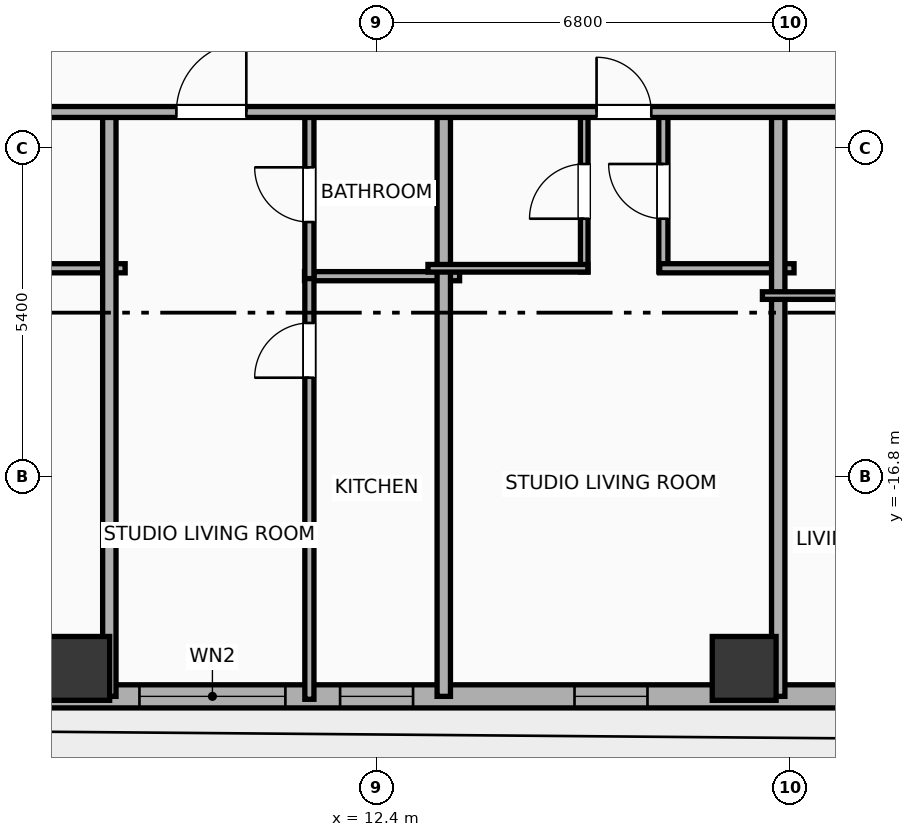
"""IFC4 building model, lengths in metres.
Left out: names, types, materials, properties, quantities, classifications, styles, units other than length and angle.
Written with IfcOpenShell. Run it as: python <this file> out.ifc"""

import sys

from ifc_helpers import new_model, si_unit, direction, frame, frame_2d, origin, origin_2d, place, context, subcontext, project, spatial, rectangle, hollow_rectangle, extrude, element, fill, save


model = new_model("IFC4")
c1 = context("Model", 3, precision=1e-05, world=origin(), true_north=direction((0.0, 1.0)))
c2 = subcontext(c1, "Body", "Model", "MODEL_VIEW")
j1 = project(units=[si_unit("LENGTHUNIT", "METRE"), si_unit("PLANEANGLEUNIT", "RADIAN")], contexts=[c1])
p1 = place(None, origin())
s1 = spatial("IfcSite", under=j1, at=p1, CompositionType="ELEMENT")
p2 = place(p1, origin())
s2 = spatial("IfcBuilding", under=s1, at=p2, CompositionType="ELEMENT")
p3 = place(p2, frame((0.0, 0.0, 85.8)))
s3 = spatial("IfcBuildingStorey", under=s2, at=p3, CompositionType="ELEMENT", Elevation=85.8)
for number, where, z_axis, x_axis in (
    (1, (7.48, -19.95, -0.4), (0.0, 0.0, 1.0), (1.0, 0.0, 0.0)),
    (2, (18.44, -19.95, -0.4), (0.0, 0.0, 1.0), (1.0, 0.0, 0.0)),
):
    element("IfcColumn", number, at=place(p3, frame(where, z_axis=z_axis, x_axis=x_axis)), inside=s3, PredefinedType="COLUMN", context=c2, shape_type="SweptSolid", body=[
        extrude(hollow_rectangle(XDim=1.05, YDim=1.05, WallThickness=0.036, at=origin_2d()), origin(), (0.0, 0.0, 1.0), 4.3),
    ])
p4 = place(p3, frame((29.381, -20.41, 0.0), z_axis=(0.0, 0.0, 1.0), x_axis=(-1.0, 0.0, 0.0)))
e3 = element("IfcWall", 3, at=p4, inside=s3, PredefinedType="ELEMENTEDWALL", context=c2, shape_type="SweptSolid", body=[
    extrude(rectangle(XDim=54.763, YDim=0.38, at=frame_2d((27.381, 0.0))), origin(), (0.0, 0.0, 1.0), 2.54),
])
p5 = place(p4, frame((18.486, 0.0, 0.75)))
e4 = element("IfcOpeningElement", 4, at=p5, cuts=e3, PredefinedType="OPENING", context=c2, shape_type="SweptSolid", body=[
    extrude(rectangle(XDim=2.4, YDim=1.45, at=frame_2d((1.2, 0.725))), frame((0.0, 0.2, 0.0), z_axis=(0.0, -1.0, 0.0), x_axis=(1.0, 0.0, 0.0)), (0.0, 0.0, 1.0), 0.4),
])
p6 = place(p4, frame((47.567, 0.0, 0.75)))
e5 = element("IfcOpeningElement", 5, at=p6, cuts=e3, PredefinedType="OPENING", context=c2, shape_type="SweptSolid", body=[
    extrude(rectangle(XDim=2.4, YDim=1.45, at=frame_2d((1.2, 0.725))), frame((0.0, 0.2, 0.0), z_axis=(0.0, -1.0, 0.0), x_axis=(1.0, 0.0, 0.0)), (0.0, 0.0, 1.0), 0.4),
])
p7 = place(p4, frame((7.464, 0.0, 0.0)))
e6 = element("IfcOpeningElement", 6, at=p7, cuts=e3, PredefinedType="OPENING", context=c2, shape_type="SweptSolid", body=[
    extrude(rectangle(XDim=1.5, YDim=2.05, at=frame_2d((0.75, 1.025))), frame((0.0, 0.2, 0.0), z_axis=(0.0, -1.0, 0.0), x_axis=(1.0, 0.0, 0.0)), (0.0, 0.0, 1.0), 0.4),
])
p8 = place(p4, frame((51.831, 0.0, 0.55)))
e7 = element("IfcOpeningElement", 7, at=p8, cuts=e3, PredefinedType="OPENING", context=c2, shape_type="SweptSolid", body=[
    extrude(rectangle(XDim=1.2, YDim=1.15, at=frame_2d((0.6, 0.575))), frame((0.0, 0.2, 0.0), z_axis=(0.0, -1.0, 0.0), x_axis=(1.0, 0.0, 0.0)), (0.0, 0.0, 1.0), 0.4),
])
p9 = place(p4, frame((44.606, 0.0, 0.55)))
e8 = element("IfcOpeningElement", 8, at=p9, cuts=e3, PredefinedType="OPENING", context=c2, shape_type="SweptSolid", body=[
    extrude(rectangle(XDim=1.2, YDim=1.15, at=frame_2d((0.6, 0.575))), frame((0.0, 0.2, 0.0), z_axis=(0.0, -1.0, 0.0), x_axis=(1.0, 0.0, 0.0)), (0.0, 0.0, 1.0), 0.4),
])
p10 = place(p4, frame((38.906, 0.0, 0.55)))
e9 = element("IfcOpeningElement", 9, at=p10, cuts=e3, PredefinedType="OPENING", context=c2, shape_type="SweptSolid", body=[
    extrude(rectangle(XDim=1.2, YDim=1.15, at=frame_2d((0.6, 0.575))), frame((0.0, 0.2, 0.0), z_axis=(0.0, -1.0, 0.0), x_axis=(1.0, 0.0, 0.0)), (0.0, 0.0, 1.0), 0.4),
])
p11 = place(p4, frame((41.656, 0.0, 0.55)))
e10 = element("IfcOpeningElement", 10, at=p11, cuts=e3, PredefinedType="OPENING", context=c2, shape_type="SweptSolid", body=[
    extrude(rectangle(XDim=1.2, YDim=1.15, at=frame_2d((0.6, 0.575))), frame((0.0, 0.2, 0.0), z_axis=(0.0, -1.0, 0.0), x_axis=(1.0, 0.0, 0.0)), (0.0, 0.0, 1.0), 0.4),
])
p12 = place(p4, frame((33.666, 0.0, 0.55)))
e11 = element("IfcOpeningElement", 11, at=p12, cuts=e3, PredefinedType="OPENING", context=c2, shape_type="SweptSolid", body=[
    extrude(rectangle(XDim=1.2, YDim=1.15, at=frame_2d((0.6, 0.575))), frame((0.0, 0.2, 0.0), z_axis=(0.0, -1.0, 0.0), x_axis=(1.0, 0.0, 0.0)), (0.0, 0.0, 1.0), 0.4),
])
p13 = place(p4, frame((36.176, 0.0, 0.55)))
e12 = element("IfcOpeningElement", 12, at=p13, cuts=e3, PredefinedType="OPENING", context=c2, shape_type="SweptSolid", body=[
    extrude(rectangle(XDim=1.2, YDim=1.15, at=frame_2d((0.6, 0.575))), frame((0.0, 0.2, 0.0), z_axis=(0.0, -1.0, 0.0), x_axis=(1.0, 0.0, 0.0)), (0.0, 0.0, 1.0), 0.4),
])
p14 = place(p4, frame((27.861, 0.0, 0.55)))
e13 = element("IfcOpeningElement", 13, at=p14, cuts=e3, PredefinedType="OPENING", context=c2, shape_type="SweptSolid", body=[
    extrude(rectangle(XDim=1.2, YDim=1.15, at=frame_2d((0.6, 0.575))), frame((0.0, 0.2, 0.0), z_axis=(0.0, -1.0, 0.0), x_axis=(1.0, 0.0, 0.0)), (0.0, 0.0, 1.0), 0.4),
])
p15 = place(p4, frame((30.611, 0.0, 0.55)))
e14 = element("IfcOpeningElement", 14, at=p15, cuts=e3, PredefinedType="OPENING", context=c2, shape_type="SweptSolid", body=[
    extrude(rectangle(XDim=1.2, YDim=1.15, at=frame_2d((0.6, 0.575))), frame((0.0, 0.2, 0.0), z_axis=(0.0, -1.0, 0.0), x_axis=(1.0, 0.0, 0.0)), (0.0, 0.0, 1.0), 0.4),
])
p16 = place(p4, frame((23.531, 0.0, 0.55)))
e15 = element("IfcOpeningElement", 15, at=p16, cuts=e3, PredefinedType="OPENING", context=c2, shape_type="SweptSolid", body=[
    extrude(rectangle(XDim=1.2, YDim=1.15, at=frame_2d((0.6, 0.575))), frame((0.0, 0.2, 0.0), z_axis=(0.0, -1.0, 0.0), x_axis=(1.0, 0.0, 0.0)), (0.0, 0.0, 1.0), 0.4),
])
p17 = place(p4, frame((16.386, 0.0, 0.55)))
e16 = element("IfcOpeningElement", 16, at=p17, cuts=e3, PredefinedType="OPENING", context=c2, shape_type="SweptSolid", body=[
    extrude(rectangle(XDim=1.2, YDim=1.15, at=frame_2d((0.6, 0.575))), frame((0.0, 0.2, 0.0), z_axis=(0.0, -1.0, 0.0), x_axis=(1.0, 0.0, 0.0)), (0.0, 0.0, 1.0), 0.4),
])
p18 = place(p4, frame((12.531, 0.0, 0.55)))
e17 = element("IfcOpeningElement", 17, at=p18, cuts=e3, PredefinedType="OPENING", context=c2, shape_type="SweptSolid", body=[
    extrude(rectangle(XDim=1.2, YDim=1.15, at=frame_2d((0.6, 0.575))), frame((0.0, 0.2, 0.0), z_axis=(0.0, -1.0, 0.0), x_axis=(1.0, 0.0, 0.0)), (0.0, 0.0, 1.0), 0.4),
])
p19 = place(p4, frame((4.377, 0.0, 0.55)))
e18 = element("IfcOpeningElement", 18, at=p19, cuts=e3, PredefinedType="OPENING", context=c2, shape_type="SweptSolid", body=[
    extrude(rectangle(XDim=1.2, YDim=1.15, at=frame_2d((0.6, 0.575))), frame((0.0, 0.2, 0.0), z_axis=(0.0, -1.0, 0.0), x_axis=(1.0, 0.0, 0.0)), (0.0, 0.0, 1.0), 0.4),
])
p20 = place(p4, frame((1.481, 0.0, 0.55)))
e19 = element("IfcOpeningElement", 19, at=p20, cuts=e3, PredefinedType="OPENING", context=c2, shape_type="SweptSolid", body=[
    extrude(rectangle(XDim=1.2, YDim=1.15, at=frame_2d((0.6, 0.575))), frame((0.0, 0.2, 0.0), z_axis=(0.0, -1.0, 0.0), x_axis=(1.0, 0.0, 0.0)), (0.0, 0.0, 1.0), 0.4),
])
p21 = place(p3, frame((6.051, -13.37, 0.0), z_axis=(0.0, 0.0, 1.0), x_axis=(1.0, 0.0, 0.0)))
e20 = element("IfcWall", 20, at=p21, inside=s3, PredefinedType="PLUMBINGWALL", context=c2, shape_type="SweptSolid", body=[
    extrude(rectangle(XDim=2.209, YDim=0.15, at=frame_2d((1.104, 0.0))), origin(), (0.0, 0.0, 1.0), 3.65),
])
p22 = place(p3, frame((8.0, -20.41, 0.0), z_axis=(0.0, 0.0, 1.0), x_axis=(0.0, 1.0, 0.0)))
e21 = element("IfcWall", 21, at=p22, inside=s3, PredefinedType="PARTITIONING", context=c2, shape_type="SweptSolid", body=[
    extrude(rectangle(XDim=9.69, YDim=0.22, at=frame_2d((4.845, 0.0))), origin(), (0.0, 0.0, 1.0), 2.54),
])
p23 = place(p3, frame((11.21, -13.5, 0.0), z_axis=(0.0, 0.0, 1.0), x_axis=(1.0, 0.0, 0.0)))
e22 = element("IfcWall", 22, at=p23, inside=s3, PredefinedType="PLUMBINGWALL", context=c2, shape_type="SweptSolid", body=[
    extrude(rectangle(XDim=2.55, YDim=0.15, at=frame_2d((1.275, 0.0))), origin(), (0.0, 0.0, 1.0), 3.65),
])
p24 = place(p3, frame((11.29, -20.458, 0.0), z_axis=(0.0, 0.0, 1.0), x_axis=(0.0, 1.0, 0.0)))
e23 = element("IfcWall", 23, at=p24, inside=s3, PredefinedType="PLUMBINGWALL", context=c2, shape_type="SweptSolid", body=[
    extrude(rectangle(XDim=6.998, YDim=0.15, at=frame_2d((3.499, 0.0))), origin(), (0.0, 0.0, 1.0), 3.65),
])
p25 = place(p24, frame((5.288, 0.0, 0.0)))
e24 = element("IfcOpeningElement", 24, at=p25, cuts=e23, PredefinedType="OPENING", context=c2, shape_type="SweptSolid", body=[
    extrude(rectangle(XDim=0.9, YDim=2.05, at=frame_2d((0.45, 1.025))), frame((0.0, 0.085, 0.0), z_axis=(0.0, -1.0, 0.0), x_axis=(1.0, 0.0, 0.0)), (0.0, 0.0, 1.0), 0.17),
])
p26 = place(p3, frame((11.29, -13.54, 0.0), z_axis=(0.0, 0.0, 1.0), x_axis=(0.0, 1.0, 0.0)))
e25 = element("IfcWall", 25, at=p26, inside=s3, PredefinedType="PLUMBINGWALL", context=c2, shape_type="SweptSolid", body=[
    extrude(rectangle(XDim=2.76, YDim=0.15, at=frame_2d((1.38, 0.0))), origin(), (0.0, 0.0, 1.0), 3.65),
])
p27 = place(p26, frame((0.93, 0.0, 0.0)))
e26 = element("IfcOpeningElement", 26, at=p27, cuts=e25, PredefinedType="OPENING", context=c2, shape_type="SweptSolid", body=[
    extrude(rectangle(XDim=0.9, YDim=2.05, at=frame_2d((0.45, 1.025))), frame((0.0, 0.085, 0.0), z_axis=(0.0, -1.0, 0.0), x_axis=(1.0, 0.0, 0.0)), (0.0, 0.0, 1.0), 0.17),
])
p28 = place(p3, frame((13.5, -20.41, 0.0), z_axis=(0.0, 0.0, 1.0), x_axis=(0.0, 1.0, 0.0)))
e27 = element("IfcWall", 27, at=p28, inside=s3, PredefinedType="PARTITIONING", context=c2, shape_type="SweptSolid", body=[
    extrude(rectangle(XDim=9.69, YDim=0.22, at=frame_2d((4.845, 0.0))), origin(), (0.0, 0.0, 1.0), 3.65),
])
p29 = place(p3, frame((15.81, -13.43, 0.0), z_axis=(0.0, 0.0, 1.0), x_axis=(0.0, 1.0, 0.0)))
e28 = element("IfcWall", 28, at=p29, inside=s3, PredefinedType="PARTITIONING", context=c2, shape_type="SweptSolid", body=[
    extrude(rectangle(XDim=2.65, YDim=0.125, at=frame_2d((1.325, 0.0))), origin(), (0.0, 0.0, 1.0), 3.65),
])
p30 = place(p29, frame((0.875, 0.0, 0.0)))
e29 = element("IfcOpeningElement", 29, at=p30, cuts=e28, PredefinedType="OPENING", context=c2, shape_type="SweptSolid", body=[
    extrude(rectangle(XDim=0.9, YDim=2.05, at=frame_2d((0.45, 1.025))), frame((0.0, 0.073, 0.0), z_axis=(0.0, -1.0, 0.0), x_axis=(1.0, 0.0, 0.0)), (0.0, 0.0, 1.0), 0.145),
])
p31 = place(p3, frame((17.111, -13.43, 0.0), z_axis=(0.0, 0.0, 1.0), x_axis=(0.0, 1.0, 0.0)))
e30 = element("IfcWall", 30, at=p31, inside=s3, PredefinedType="PLUMBINGWALL", context=c2, shape_type="SweptSolid", body=[
    extrude(rectangle(XDim=2.65, YDim=0.15, at=frame_2d((1.325, 0.0))), origin(), (0.0, 0.0, 1.0), 3.65),
])
p32 = place(p31, frame((0.875, 0.0, 0.0)))
e31 = element("IfcOpeningElement", 31, at=p32, cuts=e30, PredefinedType="OPENING", context=c2, shape_type="SweptSolid", body=[
    extrude(rectangle(XDim=0.9, YDim=2.05, at=frame_2d((0.45, 1.025))), frame((0.0, 0.085, 0.0), z_axis=(0.0, -1.0, 0.0), x_axis=(1.0, 0.0, 0.0)), (0.0, 0.0, 1.0), 0.17),
])
p33 = place(p3, frame((13.24, -13.37, 0.0), z_axis=(0.0, 0.0, 1.0), x_axis=(1.0, 0.0, 0.0)))
e32 = element("IfcWall", 32, at=p33, inside=s3, PredefinedType="PARTITIONING", context=c2, shape_type="SweptSolid", body=[
    extrude(rectangle(XDim=2.63, YDim=0.125, at=frame_2d((1.315, 0.0))), origin(), (0.0, 0.0, 1.0), 3.65),
])
p34 = place(p3, frame((17.051, -13.37, 0.0), z_axis=(0.0, 0.0, 1.0), x_axis=(1.0, 0.0, 0.0)))
e33 = element("IfcWall", 33, at=p34, inside=s3, PredefinedType="PLUMBINGWALL", context=c2, shape_type="SweptSolid", body=[
    extrude(rectangle(XDim=2.209, YDim=0.15, at=frame_2d((1.104, 0.0))), origin(), (0.0, 0.0, 1.0), 3.65),
])
p35 = place(p3, frame((19.0, -20.41, 0.0), z_axis=(0.0, 0.0, 1.0), x_axis=(0.0, 1.0, 0.0)))
e34 = element("IfcWall", 34, at=p35, inside=s3, PredefinedType="PARTITIONING", context=c2, shape_type="SweptSolid", body=[
    extrude(rectangle(XDim=9.69, YDim=0.22, at=frame_2d((4.845, 0.0))), origin(), (0.0, 0.0, 1.0), 2.54),
])
p36 = place(p3, frame((18.74, -13.819, 0.0), z_axis=(0.0, 0.0, 1.0), x_axis=(1.0, 0.0, 0.0)))
e35 = element("IfcWall", 35, at=p36, inside=s3, PredefinedType="PARTITIONING", context=c2, shape_type="SweptSolid", body=[
    extrude(rectangle(XDim=2.69, YDim=0.125, at=frame_2d((1.345, 0.0))), origin(), (0.0, 0.0, 1.0), 3.65),
])
p37 = place(p3, frame((-29.21, -10.8, 0.0), z_axis=(0.0, 0.0, 1.0), x_axis=(1.0, 0.0, 0.0)))
e36 = element("IfcWall", 36, at=p37, inside=s3, PredefinedType="PARTITIONING", context=c2, shape_type="SweptSolid", body=[
    extrude(rectangle(XDim=62.42, YDim=0.18, at=frame_2d((31.21, 0.0))), origin(), (0.0, 0.0, 1.0), 3.65),
])
p38 = place(p37, frame((3.357, 0.0, 0.0)))
e37 = element("IfcOpeningElement", 37, at=p38, cuts=e36, PredefinedType="OPENING", context=c2, shape_type="SweptSolid", body=[
    extrude(rectangle(XDim=1.15, YDim=2.05, at=frame_2d((0.575, 1.025))), frame((0.0, 0.1, 0.0), z_axis=(0.0, -1.0, 0.0), x_axis=(1.0, 0.0, 0.0)), (0.0, 0.0, 1.0), 0.2),
])
p39 = place(p37, frame((10.998, 0.0, 0.0)))
e38 = element("IfcOpeningElement", 38, at=p39, cuts=e36, PredefinedType="OPENING", context=c2, shape_type="SweptSolid", body=[
    extrude(rectangle(XDim=1.15, YDim=2.05, at=frame_2d((0.575, 1.025))), frame((0.0, 0.1, 0.0), z_axis=(0.0, -1.0, 0.0), x_axis=(1.0, 0.0, 0.0)), (0.0, 0.0, 1.0), 0.2),
])
p40 = place(p37, frame((18.482, 0.0, 0.0)))
e39 = element("IfcOpeningElement", 39, at=p40, cuts=e36, PredefinedType="OPENING", context=c2, shape_type="SweptSolid", body=[
    extrude(rectangle(XDim=1.15, YDim=2.05, at=frame_2d((0.575, 1.025))), frame((0.0, 0.1, 0.0), z_axis=(0.0, -1.0, 0.0), x_axis=(1.0, 0.0, 0.0)), (0.0, 0.0, 1.0), 0.2),
])
p41 = place(p37, frame((23.962, 0.0, 0.0)))
e40 = element("IfcOpeningElement", 40, at=p41, cuts=e36, PredefinedType="OPENING", context=c2, shape_type="SweptSolid", body=[
    extrude(rectangle(XDim=1.15, YDim=2.05, at=frame_2d((0.575, 1.025))), frame((0.0, 0.1, 0.0), z_axis=(0.0, -1.0, 0.0), x_axis=(1.0, 0.0, 0.0)), (0.0, 0.0, 1.0), 0.2),
])
p42 = place(p37, frame((29.524, 0.0, 0.0)))
e41 = element("IfcOpeningElement", 41, at=p42, cuts=e36, PredefinedType="OPENING", context=c2, shape_type="SweptSolid", body=[
    extrude(rectangle(XDim=1.15, YDim=2.05, at=frame_2d((0.575, 1.025))), frame((0.0, 0.1, 0.0), z_axis=(0.0, -1.0, 0.0), x_axis=(1.0, 0.0, 0.0)), (0.0, 0.0, 1.0), 0.2),
])
p43 = place(p37, frame((34.218, 0.0, 0.0)))
e42 = element("IfcOpeningElement", 42, at=p43, cuts=e36, PredefinedType="OPENING", context=c2, shape_type="SweptSolid", body=[
    extrude(rectangle(XDim=0.9, YDim=2.05, at=frame_2d((0.45, 1.025))), frame((0.0, 0.1, 0.0), z_axis=(0.0, -1.0, 0.0), x_axis=(1.0, 0.0, 0.0)), (0.0, 0.0, 1.0), 0.2),
])
p44 = place(p37, frame((38.313, 0.0, 0.0)))
e43 = element("IfcOpeningElement", 43, at=p44, cuts=e36, PredefinedType="OPENING", context=c2, shape_type="SweptSolid", body=[
    extrude(rectangle(XDim=1.15, YDim=2.05, at=frame_2d((0.575, 1.025))), frame((0.0, 0.1, 0.0), z_axis=(0.0, -1.0, 0.0), x_axis=(1.0, 0.0, 0.0)), (0.0, 0.0, 1.0), 0.2),
])
p45 = place(p37, frame((45.223, 0.0, 0.0)))
e44 = element("IfcOpeningElement", 44, at=p45, cuts=e36, PredefinedType="OPENING", context=c2, shape_type="SweptSolid", body=[
    extrude(rectangle(XDim=0.9, YDim=2.05, at=frame_2d((0.45, 1.025))), frame((0.0, 0.1, 0.0), z_axis=(0.0, -1.0, 0.0), x_axis=(1.0, 0.0, 0.0)), (0.0, 0.0, 1.0), 0.2),
])
p46 = place(p37, frame((51.352, 0.0, 0.0)))
e45 = element("IfcOpeningElement", 45, at=p46, cuts=e36, PredefinedType="OPENING", context=c2, shape_type="SweptSolid", body=[
    extrude(rectangle(XDim=1.15, YDim=2.05, at=frame_2d((0.575, 1.025))), frame((0.0, 0.1, 0.0), z_axis=(0.0, -1.0, 0.0), x_axis=(1.0, 0.0, 0.0)), (0.0, 0.0, 1.0), 0.2),
])
p47 = place(p37, frame((58.493, 0.0, 0.0)))
e46 = element("IfcOpeningElement", 46, at=p47, cuts=e36, PredefinedType="OPENING", context=c2, shape_type="SweptSolid", body=[
    extrude(rectangle(XDim=1.15, YDim=2.05, at=frame_2d((0.575, 1.025))), frame((0.0, 0.1, 0.0), z_axis=(0.0, -1.0, 0.0), x_axis=(1.0, 0.0, 0.0)), (0.0, 0.0, 1.0), 0.2),
])
p48 = place(p5, origin())
e47 = element("IfcWindow", 47, at=p48, inside=s3, PartitioningType="SINGLE_PANEL", PredefinedType="WINDOW", context=c2, shape_type="SweptSolid", body=[
    extrude(rectangle(XDim=2.4, YDim=1.45, at=frame_2d((1.2, 0.725))), frame((0.0, 0.03, 0.0), z_axis=(0.0, -1.0, 0.0), x_axis=(1.0, 0.0, 0.0)), (0.0, 0.0, 1.0), 0.06),
])
fill(e4, e47)
p49 = place(p17, origin())
e48 = element("IfcWindow", 48, at=p49, inside=s3, PartitioningType="SINGLE_PANEL", PredefinedType="WINDOW", context=c2, shape_type="SweptSolid", body=[
    extrude(rectangle(XDim=1.2, YDim=1.15, at=frame_2d((0.6, 0.575))), frame((0.0, 0.03, 0.0), z_axis=(0.0, -1.0, 0.0), x_axis=(1.0, 0.0, 0.0)), (0.0, 0.0, 1.0), 0.06),
])
fill(e16, e48)
p50 = place(p18, origin())
e49 = element("IfcWindow", 49, at=p50, inside=s3, PartitioningType="SINGLE_PANEL", PredefinedType="WINDOW", context=c2, shape_type="SweptSolid", body=[
    extrude(rectangle(XDim=1.2, YDim=1.15, at=frame_2d((0.6, 0.575))), frame((0.0, 0.03, 0.0), z_axis=(0.0, -1.0, 0.0), x_axis=(1.0, 0.0, 0.0)), (0.0, 0.0, 1.0), 0.06),
])
fill(e17, e49)
p51 = place(p25, origin())
e50 = element("IfcDoor", 50, at=p51, inside=s3, OperationType="SINGLE_SWING_LEFT", PredefinedType="DOOR", context=c2, shape_type="SweptSolid", body=[
    extrude(rectangle(XDim=0.9, YDim=2.05, at=frame_2d((0.45, 1.025))), frame((0.0, 0.025, 0.0), z_axis=(0.0, -1.0, 0.0), x_axis=(1.0, 0.0, 0.0)), (0.0, 0.0, 1.0), 0.05),
])
fill(e24, e50)
p52 = place(p27, origin())
e51 = element("IfcDoor", 51, at=p52, inside=s3, OperationType="SINGLE_SWING_RIGHT", PredefinedType="DOOR", context=c2, shape_type="SweptSolid", body=[
    extrude(rectangle(XDim=0.9, YDim=2.05, at=frame_2d((0.45, 1.025))), frame((0.0, 0.025, 0.0), z_axis=(0.0, -1.0, 0.0), x_axis=(1.0, 0.0, 0.0)), (0.0, 0.0, 1.0), 0.05),
])
fill(e26, e51)
p53 = place(p30, origin())
e52 = element("IfcDoor", 52, at=p53, inside=s3, OperationType="SINGLE_SWING_LEFT", PredefinedType="DOOR", context=c2, shape_type="SweptSolid", body=[
    extrude(rectangle(XDim=0.9, YDim=2.05, at=frame_2d((0.45, 1.025))), frame((0.0, 0.025, 0.0), z_axis=(0.0, -1.0, 0.0), x_axis=(1.0, 0.0, 0.0)), (0.0, 0.0, 1.0), 0.05),
])
fill(e29, e52)
p54 = place(p32, origin())
e53 = element("IfcDoor", 53, at=p54, inside=s3, OperationType="SINGLE_SWING_RIGHT", PredefinedType="DOOR", context=c2, shape_type="SweptSolid", body=[
    extrude(rectangle(XDim=0.9, YDim=2.05, at=frame_2d((0.45, 1.025))), frame((0.0, 0.025, 0.0), z_axis=(0.0, -1.0, 0.0), x_axis=(1.0, 0.0, 0.0)), (0.0, 0.0, 1.0), 0.05),
])
fill(e31, e53)
p55 = place(p44, origin())
e54 = element("IfcDoor", 54, at=p55, inside=s3, OperationType="SINGLE_SWING_RIGHT", PredefinedType="DOOR", context=c2, shape_type="SweptSolid", body=[
    extrude(rectangle(XDim=1.15, YDim=2.05, at=frame_2d((0.575, 1.025))), frame((0.0, 0.025, 0.0), z_axis=(0.0, -1.0, 0.0), x_axis=(1.0, 0.0, 0.0)), (0.0, 0.0, 1.0), 0.05),
])
fill(e43, e54)
p56 = place(p45, origin())
e55 = element("IfcDoor", 55, at=p56, inside=s3, OperationType="SINGLE_SWING_LEFT", PredefinedType="DOOR", context=c2, shape_type="SweptSolid", body=[
    extrude(rectangle(XDim=0.9, YDim=2.05, at=frame_2d((0.45, 1.025))), frame((0.0, 0.025, 0.0), z_axis=(0.0, -1.0, 0.0), x_axis=(1.0, 0.0, 0.0)), (0.0, 0.0, 1.0), 0.05),
])
fill(e44, e55)
save(model, sys.argv[1])
